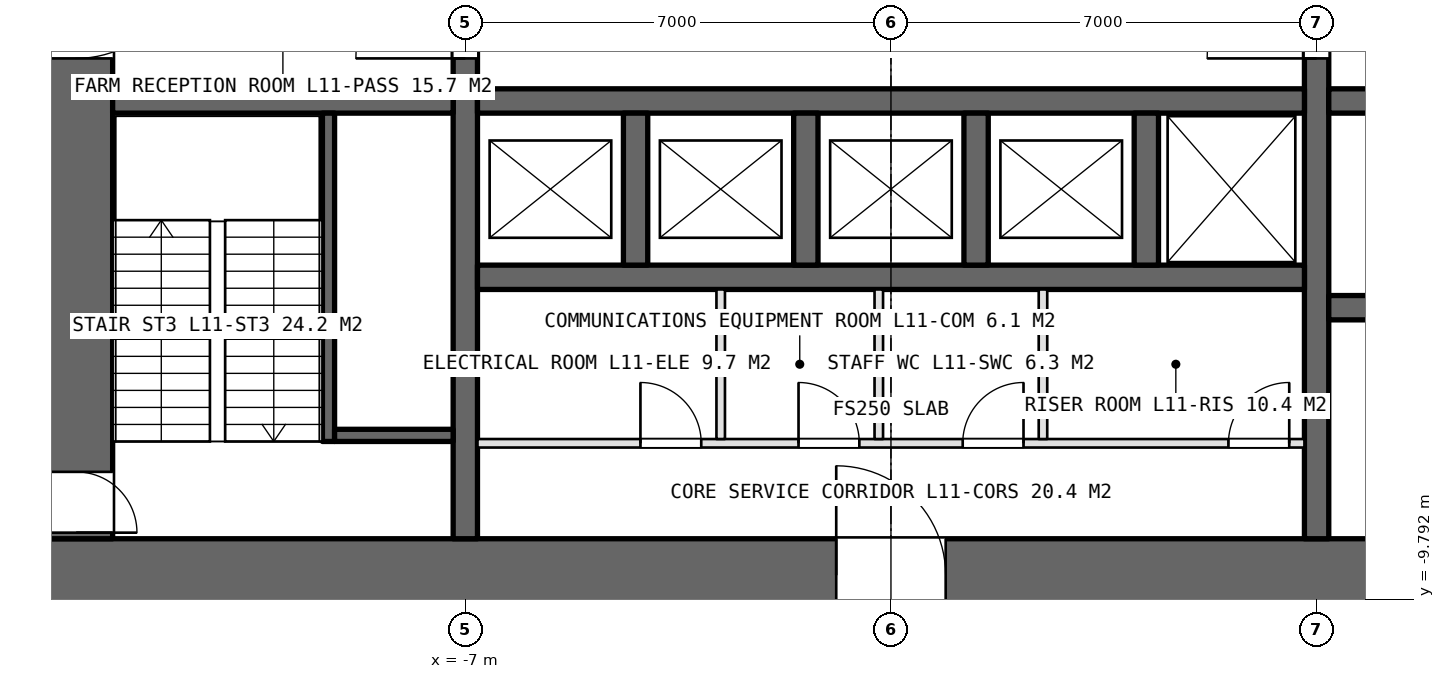
"""IFC4 building model, lengths in metres.
Left out: names, types, materials, properties, quantities, classifications, styles, units other than length and angle.
Written with IfcOpenShell. Run it as: python <this file> out.ifc"""

import sys

from ifc_helpers import new_model, si_unit, direction, frame, frame_2d, origin, place, context, subcontext, project, spatial, rectangle, extrude, element, fill, save


model = new_model("IFC4")
c1 = context("Model", 3, precision=1e-05, world=origin(), true_north=direction((0.0, 1.0)))
c2 = subcontext(c1, "Body", "Model", "MODEL_VIEW")
j1 = project(units=[si_unit("LENGTHUNIT", "METRE"), si_unit("PLANEANGLEUNIT", "RADIAN")], contexts=[c1])
p1 = place(None, origin())
s1 = spatial("IfcSite", under=j1, at=p1, CompositionType="ELEMENT")
p2 = place(p1, origin())
s2 = spatial("IfcBuilding", under=s1, at=p2, CompositionType="ELEMENT")
p3 = place(p2, frame((0.0, 0.0, 55.0)))
s3 = spatial("IfcBuildingStorey", under=s2, at=p3, CompositionType="ELEMENT", Elevation=55.0)
p4 = place(p3, frame((-14.0, -9.4, 0.0), z_axis=(0.0, 0.0, 1.0), x_axis=(1.0, 0.0, 0.0)))
e1 = element("IfcWall", 1, at=p4, inside=s3, PredefinedType="SHEAR", context=c2, shape_type="SweptSolid", body=[
    extrude(rectangle(XDim=28.0, YDim=1.2, at=frame_2d((14.0, 0.0))), origin(), (0.0, 0.0, 1.0), 5.0),
])
p5 = place(p4, frame((13.1, 0.0, 0.0)))
e2 = element("IfcOpeningElement", 2, at=p5, cuts=e1, PredefinedType="OPENING", context=c2, shape_type="SweptSolid", body=[
    extrude(rectangle(XDim=1.8, YDim=2.4, at=frame_2d((0.9, 1.2))), frame((0.0, 0.61, 0.0), z_axis=(0.0, -1.0, 0.0), x_axis=(1.0, 0.0, 0.0)), (0.0, 0.0, 1.0), 1.22),
])
p6 = place(p4, frame((22.9, 0.0, 0.0)))
e3 = element("IfcOpeningElement", 3, at=p6, cuts=e1, PredefinedType="OPENING", context=c2, shape_type="SweptSolid", body=[
    extrude(rectangle(XDim=2.2, YDim=2.7, at=frame_2d((1.1, 1.35))), frame((0.0, 0.61, 0.0), z_axis=(0.0, -1.0, 0.0), x_axis=(1.0, 0.0, 0.0)), (0.0, 0.0, 1.0), 1.22),
])
p7 = place(p3, frame((-13.4, 8.8, 0.0), z_axis=(0.0, 0.0, 1.0), x_axis=(0.0, -1.0, 0.0)))
e4 = element("IfcWall", 4, at=p7, inside=s3, PredefinedType="SHEAR", context=c2, shape_type="SweptSolid", body=[
    extrude(rectangle(XDim=17.6, YDim=1.2, at=frame_2d((8.8, 0.0))), origin(), (0.0, 0.0, 1.0), 5.0),
])
p8 = place(p7, frame((7.9, 0.0, 0.0)))
e5 = element("IfcOpeningElement", 5, at=p8, cuts=e4, PredefinedType="OPENING", context=c2, shape_type="SweptSolid", body=[
    extrude(rectangle(XDim=1.8, YDim=2.4, at=frame_2d((0.9, 1.2))), frame((0.0, 0.61, 0.0), z_axis=(0.0, -1.0, 0.0), x_axis=(1.0, 0.0, 0.0)), (0.0, 0.0, 1.0), 1.22),
])
p9 = place(p7, frame((16.5, 0.0, 0.0)))
e6 = element("IfcOpeningElement", 6, at=p9, cuts=e4, PredefinedType="OPENING", context=c2, shape_type="SweptSolid", body=[
    extrude(rectangle(XDim=1.0, YDim=2.4, at=frame_2d((0.5, 1.2))), frame((0.0, 0.61, 0.0), z_axis=(0.0, -1.0, 0.0), x_axis=(1.0, 0.0, 0.0)), (0.0, 0.0, 1.0), 1.22),
])
p10 = place(p3, frame((-7.0, -8.8, 0.0), z_axis=(0.0, 0.0, 1.0), x_axis=(0.0, 1.0, 0.0)))
e7 = element("IfcWall", 7, at=p10, inside=s3, PredefinedType="SHEAR", context=c2, shape_type="SweptSolid", body=[
    extrude(rectangle(XDim=17.6, YDim=0.4, at=frame_2d((8.8, 0.0))), origin(), (0.0, 0.0, 1.0), 5.0),
])
p11 = place(p10, frame((7.9, 0.0, 0.0)))
e8 = element("IfcOpeningElement", 8, at=p11, cuts=e7, PredefinedType="OPENING", context=c2, shape_type="SweptSolid", body=[
    extrude(rectangle(XDim=1.8, YDim=2.4, at=frame_2d((0.9, 1.2))), frame((0.0, 0.21, 0.0), z_axis=(0.0, -1.0, 0.0), x_axis=(1.0, 0.0, 0.0)), (0.0, 0.0, 1.0), 0.42),
])
p12 = place(p3, frame((7.0, -8.8, 0.0), z_axis=(0.0, 0.0, 1.0), x_axis=(0.0, 1.0, 0.0)))
e9 = element("IfcWall", 9, at=p12, inside=s3, PredefinedType="SHEAR", context=c2, shape_type="SweptSolid", body=[
    extrude(rectangle(XDim=17.6, YDim=0.4, at=frame_2d((8.8, 0.0))), origin(), (0.0, 0.0, 1.0), 5.0),
])
p13 = place(p12, frame((7.9, 0.0, 0.0)))
e10 = element("IfcOpeningElement", 10, at=p13, cuts=e9, PredefinedType="OPENING", context=c2, shape_type="SweptSolid", body=[
    extrude(rectangle(XDim=1.8, YDim=2.4, at=frame_2d((0.9, 1.2))), frame((0.0, 0.21, 0.0), z_axis=(0.0, -1.0, 0.0), x_axis=(1.0, 0.0, 0.0)), (0.0, 0.0, 1.0), 0.42),
])
for number, where, z_axis, x_axis in (
    (11, (-6.8, -1.6, 0.0), (0.0, 0.0, 1.0), (1.0, 0.0, 0.0)),
    (12, (-6.8, -4.5, 0.0), (0.0, 0.0, 1.0), (1.0, 0.0, 0.0)),
):
    element("IfcWall", number, at=place(p3, frame(where, z_axis=z_axis, x_axis=x_axis)), inside=s3, PredefinedType="SHEAR", context=c2, shape_type="SweptSolid", body=[
        extrude(rectangle(XDim=13.6, YDim=0.4, at=frame_2d((6.8, 0.0))), origin(), (0.0, 0.0, 1.0), 5.0),
    ])
p14 = place(p3, frame((-12.8, -1.6, 0.0), z_axis=(0.0, 0.0, 1.0), x_axis=(1.0, 0.0, 0.0)))
e13 = element("IfcWall", 13, at=p14, inside=s3, PredefinedType="SHEAR", context=c2, shape_type="SweptSolid", body=[
    extrude(rectangle(XDim=5.6, YDim=0.4, at=frame_2d((2.8, 0.0))), origin(), (0.0, 0.0, 1.0), 5.0),
])
p15 = place(p3, frame((7.2, -1.6, 0.0), z_axis=(0.0, 0.0, 1.0), x_axis=(1.0, 0.0, 0.0)))
e14 = element("IfcWall", 14, at=p15, inside=s3, PredefinedType="SHEAR", context=c2, shape_type="SweptSolid", body=[
    extrude(rectangle(XDim=5.6, YDim=0.4, at=frame_2d((2.8, 0.0))), origin(), (0.0, 0.0, 1.0), 5.0),
])
p16 = place(p15, frame((0.9, 0.0, 0.0)))
e15 = element("IfcOpeningElement", 15, at=p16, cuts=e14, PredefinedType="OPENING", context=c2, shape_type="SweptSolid", body=[
    extrude(rectangle(XDim=1.3, YDim=2.4, at=frame_2d((0.65, 1.2))), frame((0.0, 0.21, 0.0), z_axis=(0.0, -1.0, 0.0), x_axis=(1.0, 0.0, 0.0)), (0.0, 0.0, 1.0), 0.42),
])
p17 = place(p15, frame((3.9, 0.0, 0.0)))
e16 = element("IfcOpeningElement", 16, at=p17, cuts=e14, PredefinedType="OPENING", context=c2, shape_type="SweptSolid", body=[
    extrude(rectangle(XDim=1.3, YDim=2.4, at=frame_2d((0.65, 1.2))), frame((0.0, 0.21, 0.0), z_axis=(0.0, -1.0, 0.0), x_axis=(1.0, 0.0, 0.0)), (0.0, 0.0, 1.0), 0.42),
])
p18 = place(p3, frame((7.2, -5.0, 0.0), z_axis=(0.0, 0.0, 1.0), x_axis=(1.0, 0.0, 0.0)))
e17 = element("IfcWall", 17, at=p18, inside=s3, PredefinedType="SHEAR", context=c2, shape_type="SweptSolid", body=[
    extrude(rectangle(XDim=5.6, YDim=0.4, at=frame_2d((2.8, 0.0))), origin(), (0.0, 0.0, 1.0), 5.0),
])
for number, where, z_axis, x_axis in (
    (18, (-4.2, -4.3, 0.0), (0.0, 0.0, 1.0), (0.0, 1.0, 0.0)),
    (19, (-1.4, -4.3, 0.0), (0.0, 0.0, 1.0), (0.0, 1.0, 0.0)),
    (20, (1.4, -4.3, 0.0), (0.0, 0.0, 1.0), (0.0, 1.0, 0.0)),
    (21, (4.2, -4.3, 0.0), (0.0, 0.0, 1.0), (0.0, 1.0, 0.0)),
):
    element("IfcWall", number, at=place(p3, frame(where, z_axis=z_axis, x_axis=x_axis)), inside=s3, PredefinedType="SHEAR", context=c2, shape_type="SweptSolid", body=[
        extrude(rectangle(XDim=2.5, YDim=0.4, at=frame_2d((1.25, 0.0))), origin(), (0.0, 0.0, 1.0), 5.0),
    ])
p19 = place(p3, frame((-6.8, -7.23, 0.0), z_axis=(0.0, 0.0, 1.0), x_axis=(1.0, 0.0, 0.0)))
e22 = element("IfcWall", 22, at=p19, inside=s3, PredefinedType="PARTITIONING", context=c2, shape_type="SweptSolid", body=[
    extrude(rectangle(XDim=13.6, YDim=0.14, at=frame_2d((6.8, 0.0))), origin(), (0.0, 0.0, 1.0), 4.75),
])
p20 = place(p19, frame((2.68, 0.0, 0.0)))
e23 = element("IfcOpeningElement", 23, at=p20, cuts=e22, PredefinedType="OPENING", context=c2, shape_type="SweptSolid", body=[
    extrude(rectangle(XDim=1.0, YDim=2.4, at=frame_2d((0.5, 1.2))), frame((0.0, 0.08, 0.0), z_axis=(0.0, -1.0, 0.0), x_axis=(1.0, 0.0, 0.0)), (0.0, 0.0, 1.0), 0.16),
])
p21 = place(p19, frame((5.28, 0.0, 0.0)))
e24 = element("IfcOpeningElement", 24, at=p21, cuts=e22, PredefinedType="OPENING", context=c2, shape_type="SweptSolid", body=[
    extrude(rectangle(XDim=1.0, YDim=2.4, at=frame_2d((0.5, 1.2))), frame((0.0, 0.08, 0.0), z_axis=(0.0, -1.0, 0.0), x_axis=(1.0, 0.0, 0.0)), (0.0, 0.0, 1.0), 0.16),
])
p22 = place(p19, frame((7.98, 0.0, 0.0)))
e25 = element("IfcOpeningElement", 25, at=p22, cuts=e22, PredefinedType="OPENING", context=c2, shape_type="SweptSolid", body=[
    extrude(rectangle(XDim=1.0, YDim=2.4, at=frame_2d((0.5, 1.2))), frame((0.0, 0.08, 0.0), z_axis=(0.0, -1.0, 0.0), x_axis=(1.0, 0.0, 0.0)), (0.0, 0.0, 1.0), 0.16),
])
p23 = place(p19, frame((12.35, 0.0, 0.0)))
e26 = element("IfcOpeningElement", 26, at=p23, cuts=e22, PredefinedType="OPENING", context=c2, shape_type="SweptSolid", body=[
    extrude(rectangle(XDim=1.0, YDim=2.4, at=frame_2d((0.5, 1.2))), frame((0.0, 0.08, 0.0), z_axis=(0.0, -1.0, 0.0), x_axis=(1.0, 0.0, 0.0)), (0.0, 0.0, 1.0), 0.16),
])
for number, where, z_axis, x_axis in (
    (27, (-2.8, -4.7, 0.0), (0.0, 0.0, 1.0), (0.0, -1.0, 0.0)),
    (28, (-0.2, -4.7, 0.0), (0.0, 0.0, 1.0), (0.0, -1.0, 0.0)),
    (29, (2.5, -4.7, 0.0), (0.0, 0.0, 1.0), (0.0, -1.0, 0.0)),
):
    element("IfcWall", number, at=place(p3, frame(where, z_axis=z_axis, x_axis=x_axis)), inside=s3, PredefinedType="PARTITIONING", context=c2, shape_type="SweptSolid", body=[
        extrude(rectangle(XDim=2.46, YDim=0.14, at=frame_2d((1.23, 0.0))), origin(), (0.0, 0.0, 1.0), 4.75),
    ])
p24 = place(p3, frame((-9.25, -7.2, 0.0), z_axis=(0.0, 0.0, 1.0), x_axis=(0.0, 1.0, 0.0)))
e30 = element("IfcWall", 30, at=p24, inside=s3, PredefinedType="SOLIDWALL", context=c2, shape_type="SweptSolid", body=[
    extrude(rectangle(XDim=5.4, YDim=0.2, at=frame_2d((2.7, 0.0))), origin(), (0.0, 0.0, 1.0), 5.0),
])
p25 = place(p3, frame((-9.15, -7.1, 0.0), z_axis=(0.0, 0.0, 1.0), x_axis=(1.0, 0.0, 0.0)))
e31 = element("IfcWall", 31, at=p25, inside=s3, PredefinedType="SOLIDWALL", context=c2, shape_type="SweptSolid", body=[
    extrude(rectangle(XDim=1.95, YDim=0.2, at=frame_2d((0.975, 0.0))), origin(), (0.0, 0.0, 1.0), 5.0),
])
p26 = place(p8, origin())
e32 = element("IfcDoor", 32, at=p26, inside=s3, OperationType="DOUBLE_DOOR_SINGLE_SWING", PredefinedType="DOOR", context=c2, shape_type="SweptSolid", body=[
    extrude(rectangle(XDim=1.8, YDim=2.4, at=frame_2d((0.9, 1.2))), frame((0.0, 0.025, 0.0), z_axis=(0.0, -1.0, 0.0), x_axis=(1.0, 0.0, 0.0)), (0.0, 0.0, 1.0), 0.05),
])
fill(e5, e32)
p27 = place(p11, origin())
e33 = element("IfcDoor", 33, at=p27, inside=s3, OperationType="DOUBLE_DOOR_SINGLE_SWING", PredefinedType="DOOR", context=c2, shape_type="SweptSolid", body=[
    extrude(rectangle(XDim=1.8, YDim=2.4, at=frame_2d((0.9, 1.2))), frame((0.0, 0.025, 0.0), z_axis=(0.0, -1.0, 0.0), x_axis=(1.0, 0.0, 0.0)), (0.0, 0.0, 1.0), 0.05),
])
fill(e8, e33)
p28 = place(p13, origin())
e34 = element("IfcDoor", 34, at=p28, inside=s3, OperationType="DOUBLE_DOOR_SINGLE_SWING", PredefinedType="DOOR", context=c2, shape_type="SweptSolid", body=[
    extrude(rectangle(XDim=1.8, YDim=2.4, at=frame_2d((0.9, 1.2))), frame((0.0, 0.025, 0.0), z_axis=(0.0, -1.0, 0.0), x_axis=(1.0, 0.0, 0.0)), (0.0, 0.0, 1.0), 0.05),
])
fill(e10, e34)
p29 = place(p9, origin())
e35 = element("IfcDoor", 35, at=p29, inside=s3, OperationType="SINGLE_SWING_RIGHT", PredefinedType="DOOR", context=c2, shape_type="SweptSolid", body=[
    extrude(rectangle(XDim=1.0, YDim=2.4, at=frame_2d((0.5, 1.2))), frame((0.0, 0.025, 0.0), z_axis=(0.0, -1.0, 0.0), x_axis=(1.0, 0.0, 0.0)), (0.0, 0.0, 1.0), 0.05),
])
fill(e6, e35)
p30 = place(p20, origin())
e36 = element("IfcDoor", 36, at=p30, inside=s3, OperationType="SINGLE_SWING_LEFT", PredefinedType="DOOR", context=c2, shape_type="SweptSolid", body=[
    extrude(rectangle(XDim=1.0, YDim=2.4, at=frame_2d((0.5, 1.2))), frame((0.0, 0.025, 0.0), z_axis=(0.0, -1.0, 0.0), x_axis=(1.0, 0.0, 0.0)), (0.0, 0.0, 1.0), 0.05),
])
fill(e23, e36)
p31 = place(p21, origin())
e37 = element("IfcDoor", 37, at=p31, inside=s3, OperationType="SINGLE_SWING_LEFT", PredefinedType="DOOR", context=c2, shape_type="SweptSolid", body=[
    extrude(rectangle(XDim=1.0, YDim=2.4, at=frame_2d((0.5, 1.2))), frame((0.0, 0.025, 0.0), z_axis=(0.0, -1.0, 0.0), x_axis=(1.0, 0.0, 0.0)), (0.0, 0.0, 1.0), 0.05),
])
fill(e24, e37)
p32 = place(p22, origin())
e38 = element("IfcDoor", 38, at=p32, inside=s3, OperationType="SINGLE_SWING_RIGHT", PredefinedType="DOOR", context=c2, shape_type="SweptSolid", body=[
    extrude(rectangle(XDim=1.0, YDim=2.4, at=frame_2d((0.5, 1.2))), frame((0.0, 0.025, 0.0), z_axis=(0.0, -1.0, 0.0), x_axis=(1.0, 0.0, 0.0)), (0.0, 0.0, 1.0), 0.05),
])
fill(e25, e38)
p33 = place(p23, origin())
e39 = element("IfcDoor", 39, at=p33, inside=s3, OperationType="SINGLE_SWING_RIGHT", PredefinedType="DOOR", context=c2, shape_type="SweptSolid", body=[
    extrude(rectangle(XDim=1.0, YDim=2.4, at=frame_2d((0.5, 1.2))), frame((0.0, 0.025, 0.0), z_axis=(0.0, -1.0, 0.0), x_axis=(1.0, 0.0, 0.0)), (0.0, 0.0, 1.0), 0.05),
])
fill(e26, e39)
p34 = place(p5, origin())
e40 = element("IfcDoor", 40, at=p34, inside=s3, OperationType="DOUBLE_DOOR_SINGLE_SWING", PredefinedType="DOOR", context=c2, shape_type="SweptSolid", body=[
    extrude(rectangle(XDim=1.8, YDim=2.4, at=frame_2d((0.9, 1.2))), frame((0.0, 0.025, 0.0), z_axis=(0.0, -1.0, 0.0), x_axis=(1.0, 0.0, 0.0)), (0.0, 0.0, 1.0), 0.05),
])
fill(e2, e40)
save(model, sys.argv[1])
